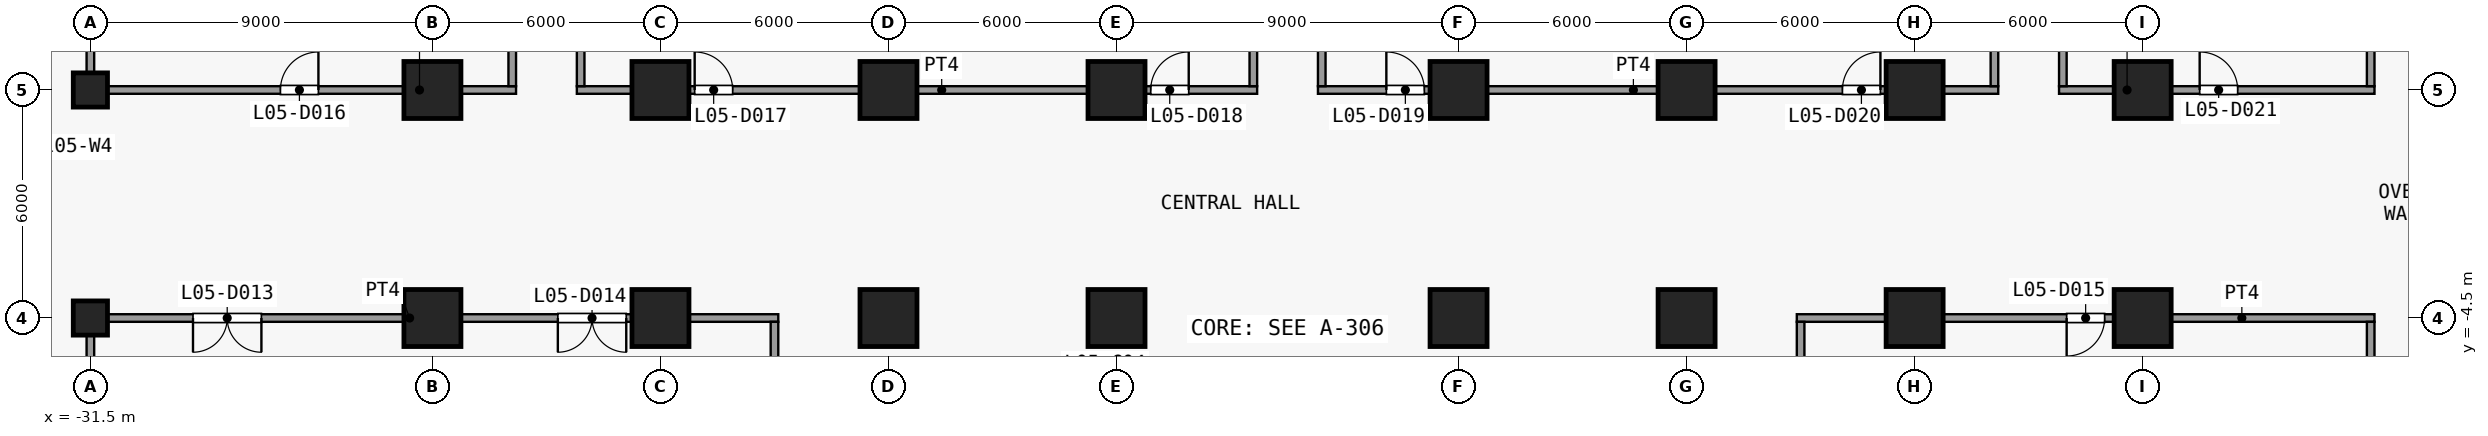
"""IFC4 building model, lengths in metres.
Left out: names, types, materials, properties, quantities, classifications, styles, units other than length and angle.
Written with IfcOpenShell. Run it as: python <this file> out.ifc"""

import sys

from ifc_helpers import new_model, si_unit, direction, frame, frame_2d, origin, origin_2d, place, context, subcontext, project, spatial, rectangle, extrude, element, fill, save


model = new_model("IFC4")
c1 = context("Model", 3, precision=1e-05, world=origin(), true_north=direction((0.0, 1.0)))
c2 = subcontext(c1, "Body", "Model", "MODEL_VIEW")
j1 = project(units=[si_unit("LENGTHUNIT", "METRE"), si_unit("PLANEANGLEUNIT", "RADIAN")], contexts=[c1])
p1 = place(None, origin())
s1 = spatial("IfcSite", under=j1, at=p1, CompositionType="ELEMENT")
p2 = place(p1, origin())
s2 = spatial("IfcBuilding", under=s1, at=p2, CompositionType="ELEMENT")
p3 = place(p2, frame((0.0, 0.0, 28.0)))
s3 = spatial("IfcBuildingStorey", under=s2, at=p3, CompositionType="ELEMENT", Elevation=28.0)
for number, where, z_axis, x_axis in (
    (1, (-31.5, -4.5, 0.0), (0.0, 0.0, 1.0), (1.0, 0.0, 0.0)),
    (2, (-31.5, 1.5, 0.0), (0.0, 0.0, 1.0), (1.0, 0.0, 0.0)),
):
    element("IfcColumn", number, at=place(p3, frame(where, z_axis=z_axis, x_axis=x_axis)), inside=s3, PredefinedType="COLUMN", context=c2, shape_type="SweptSolid", body=[
        extrude(rectangle(XDim=0.9, YDim=0.9, at=origin_2d()), origin(), (0.0, 0.0, 1.0), 4.5),
    ])
for number, where, z_axis, x_axis in (
    (3, (-22.5, -4.5, 0.0), (0.0, 0.0, 1.0), (1.0, 0.0, 0.0)),
    (4, (-22.5, 1.5, 0.0), (0.0, 0.0, 1.0), (1.0, 0.0, 0.0)),
    (5, (-16.5, -4.5, 0.0), (0.0, 0.0, 1.0), (1.0, 0.0, 0.0)),
    (6, (-16.5, 1.5, 0.0), (0.0, 0.0, 1.0), (1.0, 0.0, 0.0)),
    (7, (-10.5, -4.5, 0.0), (0.0, 0.0, 1.0), (1.0, 0.0, 0.0)),
    (8, (-10.5, 1.5, 0.0), (0.0, 0.0, 1.0), (1.0, 0.0, 0.0)),
    (9, (-4.5, -4.5, 0.0), (0.0, 0.0, 1.0), (1.0, 0.0, 0.0)),
    (10, (-4.5, 1.5, 0.0), (0.0, 0.0, 1.0), (1.0, 0.0, 0.0)),
    (11, (4.5, -4.5, 0.0), (0.0, 0.0, 1.0), (1.0, 0.0, 0.0)),
    (12, (4.5, 1.5, 0.0), (0.0, 0.0, 1.0), (1.0, 0.0, 0.0)),
    (13, (10.5, -4.5, 0.0), (0.0, 0.0, 1.0), (1.0, 0.0, 0.0)),
    (14, (10.5, 1.5, 0.0), (0.0, 0.0, 1.0), (1.0, 0.0, 0.0)),
    (15, (16.5, -4.5, 0.0), (0.0, 0.0, 1.0), (1.0, 0.0, 0.0)),
    (16, (16.5, 1.5, 0.0), (0.0, 0.0, 1.0), (1.0, 0.0, 0.0)),
    (17, (22.5, -4.5, 0.0), (0.0, 0.0, 1.0), (1.0, 0.0, 0.0)),
    (18, (22.5, 1.5, 0.0), (0.0, 0.0, 1.0), (1.0, 0.0, 0.0)),
):
    element("IfcColumn", number, at=place(p3, frame(where, z_axis=z_axis, x_axis=x_axis)), inside=s3, PredefinedType="COLUMN", context=c2, shape_type="SweptSolid", body=[
        extrude(rectangle(XDim=1.5, YDim=1.5, at=origin_2d()), origin(), (0.0, 0.0, 1.0), 4.5),
    ])
p4 = place(p3, frame((-31.6, -4.5, 0.0), z_axis=(0.0, 0.0, 1.0), x_axis=(1.0, 0.0, 0.0)))
e19 = element("IfcWall", 19, at=p4, inside=s3, PredefinedType="PARTITIONING", context=c2, shape_type="SweptSolid", body=[
    extrude(rectangle(XDim=18.2, YDim=0.2, at=frame_2d((9.1, 0.0))), origin(), (0.0, 0.0, 1.0), 4.1),
])
p5 = place(p4, frame((2.8, 0.0, 0.0)))
e20 = element("IfcOpeningElement", 20, at=p5, cuts=e19, PredefinedType="OPENING", context=c2, shape_type="SweptSolid", body=[
    extrude(rectangle(XDim=1.8, YDim=2.1, at=frame_2d((0.9, 1.05))), frame((0.0, 0.11, 0.0), z_axis=(0.0, -1.0, 0.0), x_axis=(1.0, 0.0, 0.0)), (0.0, 0.0, 1.0), 0.22),
])
p6 = place(p4, frame((12.4, 0.0, 0.0)))
e21 = element("IfcOpeningElement", 21, at=p6, cuts=e19, PredefinedType="OPENING", context=c2, shape_type="SweptSolid", body=[
    extrude(rectangle(XDim=1.8, YDim=2.1, at=frame_2d((0.9, 1.05))), frame((0.0, 0.11, 0.0), z_axis=(0.0, -1.0, 0.0), x_axis=(1.0, 0.0, 0.0)), (0.0, 0.0, 1.0), 0.22),
])
p7 = place(p3, frame((13.4, -4.5, 0.0), z_axis=(0.0, 0.0, 1.0), x_axis=(1.0, 0.0, 0.0)))
e22 = element("IfcWall", 22, at=p7, inside=s3, PredefinedType="PARTITIONING", context=c2, shape_type="SweptSolid", body=[
    extrude(rectangle(XDim=15.2, YDim=0.2, at=frame_2d((7.6, 0.0))), origin(), (0.0, 0.0, 1.0), 4.1),
])
p8 = place(p7, frame((7.1, 0.0, 0.0)))
e23 = element("IfcOpeningElement", 23, at=p8, cuts=e22, PredefinedType="OPENING", context=c2, shape_type="SweptSolid", body=[
    extrude(rectangle(XDim=1.0, YDim=2.1, at=frame_2d((0.5, 1.05))), frame((0.0, 0.11, 0.0), z_axis=(0.0, -1.0, 0.0), x_axis=(1.0, 0.0, 0.0)), (0.0, 0.0, 1.0), 0.22),
])
p9 = place(p3, frame((-31.6, 1.5, 0.0), z_axis=(0.0, 0.0, 1.0), x_axis=(1.0, 0.0, 0.0)))
e24 = element("IfcWall", 24, at=p9, inside=s3, PredefinedType="PARTITIONING", context=c2, shape_type="SweptSolid", body=[
    extrude(rectangle(XDim=11.3, YDim=0.2, at=frame_2d((5.65, 0.0))), origin(), (0.0, 0.0, 1.0), 4.1),
])
p10 = place(p9, frame((5.1, 0.0, 0.0)))
e25 = element("IfcOpeningElement", 25, at=p10, cuts=e24, PredefinedType="OPENING", context=c2, shape_type="SweptSolid", body=[
    extrude(rectangle(XDim=1.0, YDim=2.1, at=frame_2d((0.5, 1.05))), frame((0.0, 0.11, 0.0), z_axis=(0.0, -1.0, 0.0), x_axis=(1.0, 0.0, 0.0)), (0.0, 0.0, 1.0), 0.22),
])
p11 = place(p3, frame((-18.7, 1.5, 0.0), z_axis=(0.0, 0.0, 1.0), x_axis=(1.0, 0.0, 0.0)))
e26 = element("IfcWall", 26, at=p11, inside=s3, PredefinedType="PARTITIONING", context=c2, shape_type="SweptSolid", body=[
    extrude(rectangle(XDim=17.9, YDim=0.2, at=frame_2d((8.95, 0.0))), origin(), (0.0, 0.0, 1.0), 4.1),
])
p12 = place(p11, frame((3.1, 0.0, 0.0)))
e27 = element("IfcOpeningElement", 27, at=p12, cuts=e26, PredefinedType="OPENING", context=c2, shape_type="SweptSolid", body=[
    extrude(rectangle(XDim=1.0, YDim=2.1, at=frame_2d((0.5, 1.05))), frame((0.0, 0.11, 0.0), z_axis=(0.0, -1.0, 0.0), x_axis=(1.0, 0.0, 0.0)), (0.0, 0.0, 1.0), 0.22),
])
p13 = place(p11, frame((15.1, 0.0, 0.0)))
e28 = element("IfcOpeningElement", 28, at=p13, cuts=e26, PredefinedType="OPENING", context=c2, shape_type="SweptSolid", body=[
    extrude(rectangle(XDim=1.0, YDim=2.1, at=frame_2d((0.5, 1.05))), frame((0.0, 0.11, 0.0), z_axis=(0.0, -1.0, 0.0), x_axis=(1.0, 0.0, 0.0)), (0.0, 0.0, 1.0), 0.22),
])
p14 = place(p3, frame((0.8, 1.5, 0.0), z_axis=(0.0, 0.0, 1.0), x_axis=(1.0, 0.0, 0.0)))
e29 = element("IfcWall", 29, at=p14, inside=s3, PredefinedType="PARTITIONING", context=c2, shape_type="SweptSolid", body=[
    extrude(rectangle(XDim=17.9, YDim=0.2, at=frame_2d((8.95, 0.0))), origin(), (0.0, 0.0, 1.0), 4.1),
])
p15 = place(p14, frame((1.8, 0.0, 0.0)))
e30 = element("IfcOpeningElement", 30, at=p15, cuts=e29, PredefinedType="OPENING", context=c2, shape_type="SweptSolid", body=[
    extrude(rectangle(XDim=1.0, YDim=2.1, at=frame_2d((0.5, 1.05))), frame((0.0, 0.11, 0.0), z_axis=(0.0, -1.0, 0.0), x_axis=(1.0, 0.0, 0.0)), (0.0, 0.0, 1.0), 0.22),
])
p16 = place(p14, frame((13.8, 0.0, 0.0)))
e31 = element("IfcOpeningElement", 31, at=p16, cuts=e29, PredefinedType="OPENING", context=c2, shape_type="SweptSolid", body=[
    extrude(rectangle(XDim=1.0, YDim=2.1, at=frame_2d((0.5, 1.05))), frame((0.0, 0.11, 0.0), z_axis=(0.0, -1.0, 0.0), x_axis=(1.0, 0.0, 0.0)), (0.0, 0.0, 1.0), 0.22),
])
p17 = place(p3, frame((20.3, 1.5, 0.0), z_axis=(0.0, 0.0, 1.0), x_axis=(1.0, 0.0, 0.0)))
e32 = element("IfcWall", 32, at=p17, inside=s3, PredefinedType="PARTITIONING", context=c2, shape_type="SweptSolid", body=[
    extrude(rectangle(XDim=8.3, YDim=0.2, at=frame_2d((4.15, 0.0))), origin(), (0.0, 0.0, 1.0), 4.1),
])
p18 = place(p17, frame((3.7, 0.0, 0.0)))
e33 = element("IfcOpeningElement", 33, at=p18, cuts=e32, PredefinedType="OPENING", context=c2, shape_type="SweptSolid", body=[
    extrude(rectangle(XDim=1.0, YDim=2.1, at=frame_2d((0.5, 1.05))), frame((0.0, 0.11, 0.0), z_axis=(0.0, -1.0, 0.0), x_axis=(1.0, 0.0, 0.0)), (0.0, 0.0, 1.0), 0.22),
])
p19 = place(p3, frame((-31.5, -19.4, 0.0), z_axis=(0.0, 0.0, 1.0), x_axis=(0.0, 1.0, 0.0)))
e34 = element("IfcWall", 34, at=p19, inside=s3, PredefinedType="PARTITIONING", context=c2, shape_type="SweptSolid", body=[
    extrude(rectangle(XDim=14.8, YDim=0.2, at=frame_2d((7.4, 0.0))), origin(), (0.0, 0.0, 1.0), 4.1),
])
for number, where, z_axis, x_axis in (
    (35, (-31.5, 1.6, 0.0), (0.0, 0.0, 1.0), (0.0, 1.0, 0.0)),
    (36, (-20.4, 1.6, 0.0), (0.0, 0.0, 1.0), (0.0, 1.0, 0.0)),
    (37, (-18.6, 1.6, 0.0), (0.0, 0.0, 1.0), (0.0, 1.0, 0.0)),
):
    element("IfcWall", number, at=place(p3, frame(where, z_axis=z_axis, x_axis=x_axis)), inside=s3, PredefinedType="PARTITIONING", context=c2, shape_type="SweptSolid", body=[
        extrude(rectangle(XDim=11.8, YDim=0.2, at=frame_2d((5.9, 0.0))), origin(), (0.0, 0.0, 1.0), 4.1),
    ])
p20 = place(p3, frame((-13.5, -7.9, 0.0), z_axis=(0.0, 0.0, 1.0), x_axis=(0.0, 1.0, 0.0)))
e38 = element("IfcWall", 38, at=p20, inside=s3, PredefinedType="PARTITIONING", context=c2, shape_type="SweptSolid", body=[
    extrude(rectangle(XDim=3.3, YDim=0.2, at=frame_2d((1.65, 0.0))), origin(), (0.0, 0.0, 1.0), 4.1),
])
for number, where, z_axis, x_axis in (
    (39, (-0.9, 1.6, 0.0), (0.0, 0.0, 1.0), (0.0, 1.0, 0.0)),
    (40, (0.9, 1.6, 0.0), (0.0, 0.0, 1.0), (0.0, 1.0, 0.0)),
):
    element("IfcWall", number, at=place(p3, frame(where, z_axis=z_axis, x_axis=x_axis)), inside=s3, PredefinedType="PARTITIONING", context=c2, shape_type="SweptSolid", body=[
        extrude(rectangle(XDim=11.8, YDim=0.2, at=frame_2d((5.9, 0.0))), origin(), (0.0, 0.0, 1.0), 4.1),
    ])
p21 = place(p3, frame((13.5, -7.9, 0.0), z_axis=(0.0, 0.0, 1.0), x_axis=(0.0, 1.0, 0.0)))
e41 = element("IfcWall", 41, at=p21, inside=s3, PredefinedType="PARTITIONING", context=c2, shape_type="SweptSolid", body=[
    extrude(rectangle(XDim=3.3, YDim=0.2, at=frame_2d((1.65, 0.0))), origin(), (0.0, 0.0, 1.0), 4.1),
])
for number, where, z_axis, x_axis in (
    (42, (18.6, 1.6, 0.0), (0.0, 0.0, 1.0), (0.0, 1.0, 0.0)),
    (43, (20.4, 1.6, 0.0), (0.0, 0.0, 1.0), (0.0, 1.0, 0.0)),
):
    element("IfcWall", number, at=place(p3, frame(where, z_axis=z_axis, x_axis=x_axis)), inside=s3, PredefinedType="PARTITIONING", context=c2, shape_type="SweptSolid", body=[
        extrude(rectangle(XDim=11.8, YDim=0.2, at=frame_2d((5.9, 0.0))), origin(), (0.0, 0.0, 1.0), 4.1),
    ])
p22 = place(p3, frame((28.5, -19.4, 0.0), z_axis=(0.0, 0.0, 1.0), x_axis=(0.0, 1.0, 0.0)))
e44 = element("IfcWall", 44, at=p22, inside=s3, PredefinedType="PARTITIONING", context=c2, shape_type="SweptSolid", body=[
    extrude(rectangle(XDim=14.8, YDim=0.2, at=frame_2d((7.4, 0.0))), origin(), (0.0, 0.0, 1.0), 4.1),
])
p23 = place(p3, frame((28.5, 1.6, 0.0), z_axis=(0.0, 0.0, 1.0), x_axis=(0.0, 1.0, 0.0)))
e45 = element("IfcWall", 45, at=p23, inside=s3, PredefinedType="PARTITIONING", context=c2, shape_type="SweptSolid", body=[
    extrude(rectangle(XDim=11.8, YDim=0.2, at=frame_2d((5.9, 0.0))), origin(), (0.0, 0.0, 1.0), 4.1),
])
p24 = place(p5, origin())
e46 = element("IfcDoor", 46, at=p24, inside=s3, OperationType="DOUBLE_DOOR_SINGLE_SWING", PredefinedType="DOOR", context=c2, shape_type="SweptSolid", body=[
    extrude(rectangle(XDim=1.8, YDim=2.1, at=frame_2d((0.9, 1.05))), frame((0.0, 0.025, 0.0), z_axis=(0.0, -1.0, 0.0), x_axis=(1.0, 0.0, 0.0)), (0.0, 0.0, 1.0), 0.05),
])
fill(e20, e46)
p25 = place(p6, origin())
e47 = element("IfcDoor", 47, at=p25, inside=s3, OperationType="DOUBLE_DOOR_SINGLE_SWING", PredefinedType="DOOR", context=c2, shape_type="SweptSolid", body=[
    extrude(rectangle(XDim=1.8, YDim=2.1, at=frame_2d((0.9, 1.05))), frame((0.0, 0.025, 0.0), z_axis=(0.0, -1.0, 0.0), x_axis=(1.0, 0.0, 0.0)), (0.0, 0.0, 1.0), 0.05),
])
fill(e21, e47)
p26 = place(p8, origin())
e48 = element("IfcDoor", 48, at=p26, inside=s3, OperationType="SINGLE_SWING_LEFT", PredefinedType="DOOR", context=c2, shape_type="SweptSolid", body=[
    extrude(rectangle(XDim=1.0, YDim=2.1, at=frame_2d((0.5, 1.05))), frame((0.0, 0.025, 0.0), z_axis=(0.0, -1.0, 0.0), x_axis=(1.0, 0.0, 0.0)), (0.0, 0.0, 1.0), 0.05),
])
fill(e23, e48)
p27 = place(p10, origin())
e49 = element("IfcDoor", 49, at=p27, inside=s3, OperationType="SINGLE_SWING_LEFT", PredefinedType="DOOR", context=c2, shape_type="SweptSolid", body=[
    extrude(rectangle(XDim=1.0, YDim=2.1, at=frame_2d((0.5, 1.05))), frame((0.0, 0.025, 0.0), z_axis=(0.0, -1.0, 0.0), x_axis=(1.0, 0.0, 0.0)), (0.0, 0.0, 1.0), 0.05),
])
fill(e25, e49)
p28 = place(p12, origin())
e50 = element("IfcDoor", 50, at=p28, inside=s3, OperationType="SINGLE_SWING_RIGHT", PredefinedType="DOOR", context=c2, shape_type="SweptSolid", body=[
    extrude(rectangle(XDim=1.0, YDim=2.1, at=frame_2d((0.5, 1.05))), frame((0.0, 0.025, 0.0), z_axis=(0.0, -1.0, 0.0), x_axis=(1.0, 0.0, 0.0)), (0.0, 0.0, 1.0), 0.05),
])
fill(e27, e50)
p29 = place(p13, origin())
e51 = element("IfcDoor", 51, at=p29, inside=s3, OperationType="SINGLE_SWING_LEFT", PredefinedType="DOOR", context=c2, shape_type="SweptSolid", body=[
    extrude(rectangle(XDim=1.0, YDim=2.1, at=frame_2d((0.5, 1.05))), frame((0.0, 0.025, 0.0), z_axis=(0.0, -1.0, 0.0), x_axis=(1.0, 0.0, 0.0)), (0.0, 0.0, 1.0), 0.05),
])
fill(e28, e51)
p30 = place(p15, origin())
e52 = element("IfcDoor", 52, at=p30, inside=s3, OperationType="SINGLE_SWING_RIGHT", PredefinedType="DOOR", context=c2, shape_type="SweptSolid", body=[
    extrude(rectangle(XDim=1.0, YDim=2.1, at=frame_2d((0.5, 1.05))), frame((0.0, 0.025, 0.0), z_axis=(0.0, -1.0, 0.0), x_axis=(1.0, 0.0, 0.0)), (0.0, 0.0, 1.0), 0.05),
])
fill(e30, e52)
p31 = place(p16, origin())
e53 = element("IfcDoor", 53, at=p31, inside=s3, OperationType="SINGLE_SWING_LEFT", PredefinedType="DOOR", context=c2, shape_type="SweptSolid", body=[
    extrude(rectangle(XDim=1.0, YDim=2.1, at=frame_2d((0.5, 1.05))), frame((0.0, 0.025, 0.0), z_axis=(0.0, -1.0, 0.0), x_axis=(1.0, 0.0, 0.0)), (0.0, 0.0, 1.0), 0.05),
])
fill(e31, e53)
p32 = place(p18, origin())
e54 = element("IfcDoor", 54, at=p32, inside=s3, OperationType="SINGLE_SWING_RIGHT", PredefinedType="DOOR", context=c2, shape_type="SweptSolid", body=[
    extrude(rectangle(XDim=1.0, YDim=2.1, at=frame_2d((0.5, 1.05))), frame((0.0, 0.025, 0.0), z_axis=(0.0, -1.0, 0.0), x_axis=(1.0, 0.0, 0.0)), (0.0, 0.0, 1.0), 0.05),
])
fill(e33, e54)
save(model, sys.argv[1])
